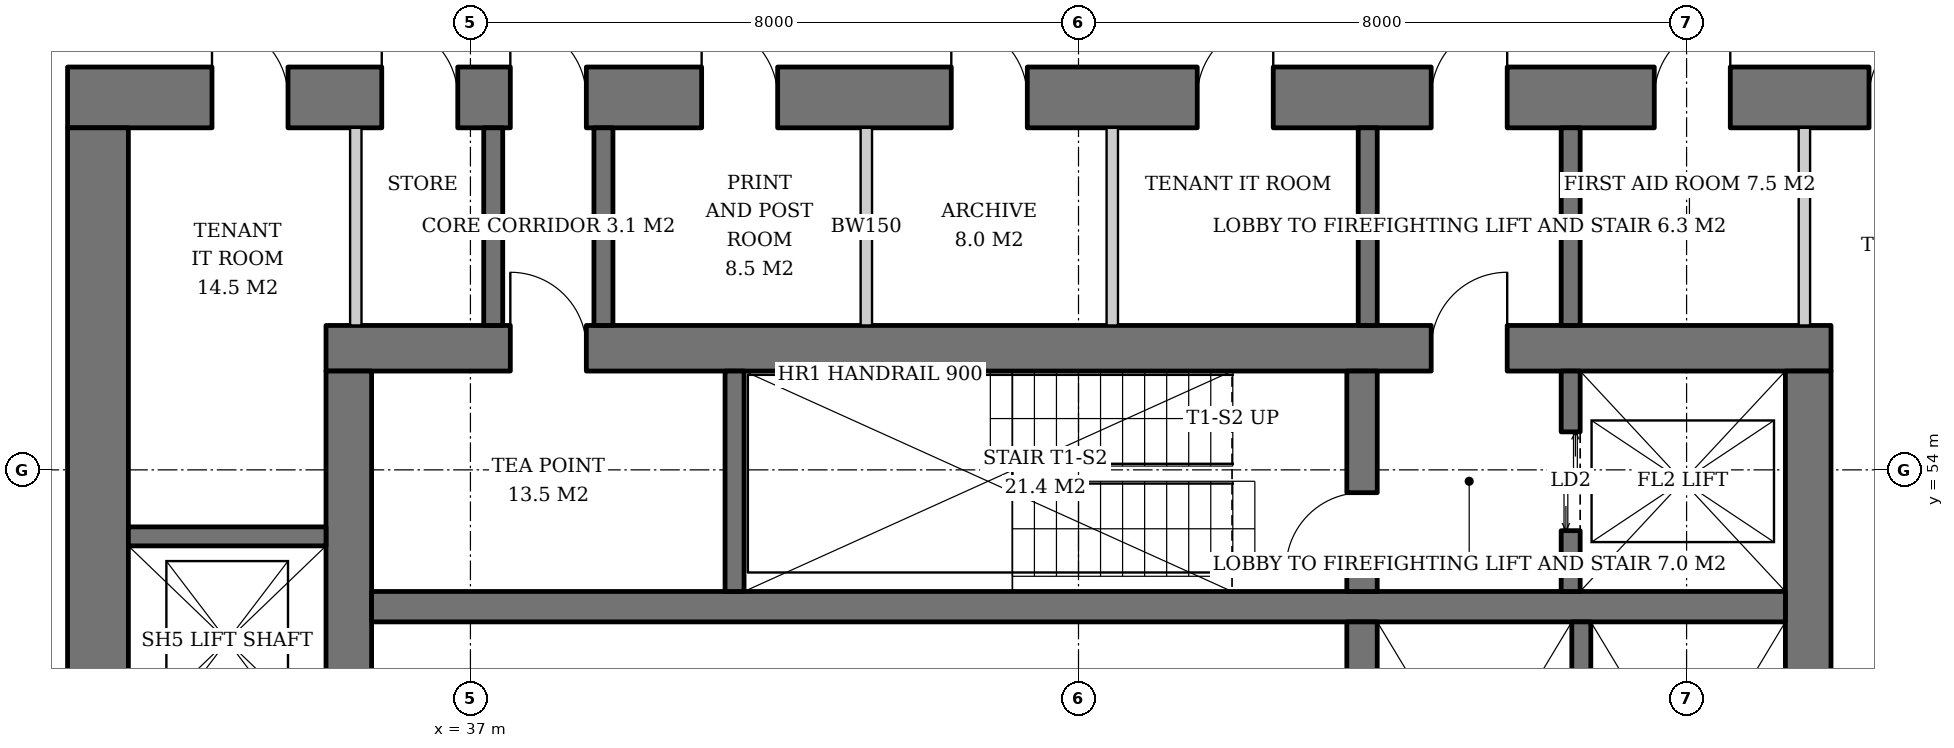
"""IFC4 building model, lengths in metres.
Left out: names, types, materials, properties, quantities, classifications, styles, units other than length and angle.
Written with IfcOpenShell. Run it as: python <this file> out.ifc"""

import sys

from ifc_helpers import new_model, si_unit, direction, frame, frame_2d, origin, place, context, subcontext, project, spatial, rectangle, extrude, element, fill, save


model = new_model("IFC4")
c1 = context("Model", 3, precision=1e-05, world=origin(), true_north=direction((0.0, 1.0)))
c2 = subcontext(c1, "Body", "Model", "MODEL_VIEW")
j1 = project(units=[si_unit("LENGTHUNIT", "METRE"), si_unit("PLANEANGLEUNIT", "RADIAN")], contexts=[c1])
p1 = place(None, origin())
s1 = spatial("IfcSite", under=j1, at=p1, CompositionType="ELEMENT")
p2 = place(p1, origin())
s2 = spatial("IfcBuilding", under=s1, at=p2, CompositionType="ELEMENT")
p3 = place(p2, frame((0.0, 0.0, 51.4)))
s3 = spatial("IfcBuildingStorey", under=s2, at=p3, CompositionType="ELEMENT", Elevation=51.4)
p4 = place(p3, frame((35.1, 55.6, 0.0), z_axis=(0.0, 0.0, 1.0), x_axis=(1.0, 0.0, 0.0)))
e1 = element("IfcWall", 1, at=p4, inside=s3, PredefinedType="SHEAR", context=c2, shape_type="SweptSolid", body=[
    extrude(rectangle(XDim=19.8, YDim=0.6, at=frame_2d((9.9, 0.0))), origin(), (0.0, 0.0, 1.0), 3.8),
])
p5 = place(p4, frame((14.54, 0.0, 0.0)))
e2 = element("IfcOpeningElement", 2, at=p5, cuts=e1, PredefinedType="OPENING", context=c2, shape_type="SweptSolid", body=[
    extrude(rectangle(XDim=1.0, YDim=2.1, at=frame_2d((0.5, 1.05))), frame((0.0, 0.31, 0.0), z_axis=(0.0, -1.0, 0.0), x_axis=(1.0, 0.0, 0.0)), (0.0, 0.0, 1.0), 0.62),
])
p6 = place(p4, frame((2.425, 0.0, 0.0)))
e3 = element("IfcOpeningElement", 3, at=p6, cuts=e1, PredefinedType="OPENING", context=c2, shape_type="SweptSolid", body=[
    extrude(rectangle(XDim=1.0, YDim=2.1, at=frame_2d((0.5, 1.05))), frame((0.0, 0.31, 0.0), z_axis=(0.0, -1.0, 0.0), x_axis=(1.0, 0.0, 0.0)), (0.0, 0.0, 1.0), 0.62),
])
p7 = place(p3, frame((35.4, 36.7, 0.0), z_axis=(0.0, 0.0, 1.0), x_axis=(0.0, 1.0, 0.0)))
e4 = element("IfcWall", 4, at=p7, inside=s3, PredefinedType="SHEAR", context=c2, shape_type="SweptSolid", body=[
    extrude(rectangle(XDim=18.6, YDim=0.6, at=frame_2d((9.3, 0.0))), origin(), (0.0, 0.0, 1.0), 3.8),
])
p8 = place(p7, frame((8.4, 0.0, 0.0)))
e5 = element("IfcOpeningElement", 5, at=p8, cuts=e4, PredefinedType="OPENING", context=c2, shape_type="SweptSolid", body=[
    extrude(rectangle(XDim=1.8, YDim=2.4, at=frame_2d((0.9, 1.2))), frame((0.0, 0.31, 0.0), z_axis=(0.0, -1.0, 0.0), x_axis=(1.0, 0.0, 0.0)), (0.0, 0.0, 1.0), 0.62),
])
p9 = place(p3, frame((54.6, 36.7, 0.0), z_axis=(0.0, 0.0, 1.0), x_axis=(0.0, 1.0, 0.0)))
e6 = element("IfcWall", 6, at=p9, inside=s3, PredefinedType="SHEAR", context=c2, shape_type="SweptSolid", body=[
    extrude(rectangle(XDim=18.6, YDim=0.6, at=frame_2d((9.3, 0.0))), origin(), (0.0, 0.0, 1.0), 3.8),
])
p10 = place(p9, frame((8.4, 0.0, 0.0)))
e7 = element("IfcOpeningElement", 7, at=p10, cuts=e6, PredefinedType="OPENING", context=c2, shape_type="SweptSolid", body=[
    extrude(rectangle(XDim=1.8, YDim=2.4, at=frame_2d((0.9, 1.2))), frame((0.0, 0.31, 0.0), z_axis=(0.0, -1.0, 0.0), x_axis=(1.0, 0.0, 0.0)), (0.0, 0.0, 1.0), 0.62),
])
p11 = place(p3, frame((31.7, 58.9, 0.0), z_axis=(0.0, 0.0, 1.0), x_axis=(1.0, 0.0, 0.0)))
e8 = element("IfcWall", 8, at=p11, inside=s3, PredefinedType="SHEAR", context=c2, shape_type="SweptSolid", body=[
    extrude(rectangle(XDim=26.6, YDim=0.8, at=frame_2d((13.3, 0.0))), origin(), (0.0, 0.0, 1.0), 3.8),
])
p12 = place(p11, frame((17.94, 0.0, 0.0)))
e9 = element("IfcOpeningElement", 9, at=p12, cuts=e8, PredefinedType="OPENING", context=c2, shape_type="SweptSolid", body=[
    extrude(rectangle(XDim=1.0, YDim=2.1, at=frame_2d((0.5, 1.05))), frame((0.0, 0.41, 0.0), z_axis=(0.0, -1.0, 0.0), x_axis=(1.0, 0.0, 0.0)), (0.0, 0.0, 1.0), 0.82),
])
p13 = place(p11, frame((5.825, 0.0, 0.0)))
e10 = element("IfcOpeningElement", 10, at=p13, cuts=e8, PredefinedType="OPENING", context=c2, shape_type="SweptSolid", body=[
    extrude(rectangle(XDim=1.0, YDim=2.1, at=frame_2d((0.5, 1.05))), frame((0.0, 0.41, 0.0), z_axis=(0.0, -1.0, 0.0), x_axis=(1.0, 0.0, 0.0)), (0.0, 0.0, 1.0), 0.82),
])
p14 = place(p11, frame((1.9, 0.0, 0.0)))
e11 = element("IfcOpeningElement", 11, at=p14, cuts=e8, PredefinedType="OPENING", context=c2, shape_type="SweptSolid", body=[
    extrude(rectangle(XDim=1.0, YDim=2.1, at=frame_2d((0.5, 1.05))), frame((0.0, 0.41, 0.0), z_axis=(0.0, -1.0, 0.0), x_axis=(1.0, 0.0, 0.0)), (0.0, 0.0, 1.0), 0.82),
])
p15 = place(p11, frame((4.134, 0.0, 0.0)))
e12 = element("IfcOpeningElement", 12, at=p15, cuts=e8, PredefinedType="OPENING", context=c2, shape_type="SweptSolid", body=[
    extrude(rectangle(XDim=1.0, YDim=2.1, at=frame_2d((0.5, 1.05))), frame((0.0, 0.41, 0.0), z_axis=(0.0, -1.0, 0.0), x_axis=(1.0, 0.0, 0.0)), (0.0, 0.0, 1.0), 0.82),
])
p16 = place(p11, frame((8.342, 0.0, 0.0)))
e13 = element("IfcOpeningElement", 13, at=p16, cuts=e8, PredefinedType="OPENING", context=c2, shape_type="SweptSolid", body=[
    extrude(rectangle(XDim=1.0, YDim=2.1, at=frame_2d((0.5, 1.05))), frame((0.0, 0.41, 0.0), z_axis=(0.0, -1.0, 0.0), x_axis=(1.0, 0.0, 0.0)), (0.0, 0.0, 1.0), 0.82),
])
p17 = place(p11, frame((11.626, 0.0, 0.0)))
e14 = element("IfcOpeningElement", 14, at=p17, cuts=e8, PredefinedType="OPENING", context=c2, shape_type="SweptSolid", body=[
    extrude(rectangle(XDim=1.0, YDim=2.1, at=frame_2d((0.5, 1.05))), frame((0.0, 0.41, 0.0), z_axis=(0.0, -1.0, 0.0), x_axis=(1.0, 0.0, 0.0)), (0.0, 0.0, 1.0), 0.82),
])
p18 = place(p11, frame((14.862, 0.0, 0.0)))
e15 = element("IfcOpeningElement", 15, at=p18, cuts=e8, PredefinedType="OPENING", context=c2, shape_type="SweptSolid", body=[
    extrude(rectangle(XDim=1.0, YDim=2.1, at=frame_2d((0.5, 1.05))), frame((0.0, 0.41, 0.0), z_axis=(0.0, -1.0, 0.0), x_axis=(1.0, 0.0, 0.0)), (0.0, 0.0, 1.0), 0.82),
])
p19 = place(p11, frame((20.875, 0.0, 0.0)))
e16 = element("IfcOpeningElement", 16, at=p19, cuts=e8, PredefinedType="OPENING", context=c2, shape_type="SweptSolid", body=[
    extrude(rectangle(XDim=1.0, YDim=2.1, at=frame_2d((0.5, 1.05))), frame((0.0, 0.41, 0.0), z_axis=(0.0, -1.0, 0.0), x_axis=(1.0, 0.0, 0.0)), (0.0, 0.0, 1.0), 0.82),
])
p20 = place(p11, frame((23.7, 0.0, 0.0)))
e17 = element("IfcOpeningElement", 17, at=p20, cuts=e8, PredefinedType="OPENING", context=c2, shape_type="SweptSolid", body=[
    extrude(rectangle(XDim=1.0, YDim=2.1, at=frame_2d((0.5, 1.05))), frame((0.0, 0.41, 0.0), z_axis=(0.0, -1.0, 0.0), x_axis=(1.0, 0.0, 0.0)), (0.0, 0.0, 1.0), 0.82),
])
p21 = place(p3, frame((32.1, 33.5, 0.0), z_axis=(0.0, 0.0, 1.0), x_axis=(0.0, 1.0, 0.0)))
e18 = element("IfcWall", 18, at=p21, inside=s3, PredefinedType="SHEAR", context=c2, shape_type="SweptSolid", body=[
    extrude(rectangle(XDim=25.0, YDim=0.8, at=frame_2d((12.5, 0.0))), origin(), (0.0, 0.0, 1.0), 3.8),
])
p22 = place(p21, frame((11.6, 0.0, 0.0)))
e19 = element("IfcOpeningElement", 19, at=p22, cuts=e18, PredefinedType="OPENING", context=c2, shape_type="SweptSolid", body=[
    extrude(rectangle(XDim=1.8, YDim=2.4, at=frame_2d((0.9, 1.2))), frame((0.0, 0.41, 0.0), z_axis=(0.0, -1.0, 0.0), x_axis=(1.0, 0.0, 0.0)), (0.0, 0.0, 1.0), 0.82),
])
p23 = place(p3, frame((35.7, 52.2, 0.0), z_axis=(0.0, 0.0, 1.0), x_axis=(1.0, 0.0, 0.0)))
e20 = element("IfcWall", 20, at=p23, inside=s3, PredefinedType="SHEAR", context=c2, shape_type="SweptSolid", body=[
    extrude(rectangle(XDim=18.6, YDim=0.4, at=frame_2d((9.3, 0.0))), origin(), (0.0, 0.0, 1.0), 3.8),
])
p24 = place(p3, frame((48.73, 40.0, 0.0), z_axis=(0.0, 0.0, 1.0), x_axis=(0.0, 1.0, 0.0)))
e21 = element("IfcWall", 21, at=p24, inside=s3, PredefinedType="SHEAR", context=c2, shape_type="SweptSolid", body=[
    extrude(rectangle(XDim=12.0, YDim=0.4, at=frame_2d((6.0, 0.0))), origin(), (0.0, 0.0, 1.0), 3.8),
])
p25 = place(p3, frame((48.73, 52.4, 0.0), z_axis=(0.0, 0.0, 1.0), x_axis=(0.0, 1.0, 0.0)))
e22 = element("IfcWall", 22, at=p25, inside=s3, PredefinedType="SHEAR", context=c2, shape_type="SweptSolid", body=[
    extrude(rectangle(XDim=2.9, YDim=0.4, at=frame_2d((1.45, 0.0))), origin(), (0.0, 0.0, 1.0), 3.8),
])
p26 = place(p25, frame((0.3, 0.0, 0.0)))
e23 = element("IfcOpeningElement", 23, at=p26, cuts=e22, PredefinedType="OPENING", context=c2, shape_type="SweptSolid", body=[
    extrude(rectangle(XDim=1.0, YDim=2.1, at=frame_2d((0.5, 1.05))), frame((0.0, 0.21, 0.0), z_axis=(0.0, -1.0, 0.0), x_axis=(1.0, 0.0, 0.0)), (0.0, 0.0, 1.0), 0.42),
])
p27 = place(p3, frame((40.475, 52.4, 0.0), z_axis=(0.0, 0.0, 1.0), x_axis=(0.0, 1.0, 0.0)))
e24 = element("IfcWall", 24, at=p27, inside=s3, PredefinedType="SHEAR", context=c2, shape_type="SweptSolid", body=[
    extrude(rectangle(XDim=2.9, YDim=0.25, at=frame_2d((1.45, 0.0))), origin(), (0.0, 0.0, 1.0), 3.8),
])
p28 = place(p3, frame((51.475, 52.4, 0.0), z_axis=(0.0, 0.0, 1.0), x_axis=(0.0, 1.0, 0.0)))
e25 = element("IfcWall", 25, at=p28, inside=s3, PredefinedType="SHEAR", context=c2, shape_type="SweptSolid", body=[
    extrude(rectangle(XDim=2.9, YDim=0.25, at=frame_2d((1.45, 0.0))), origin(), (0.0, 0.0, 1.0), 3.8),
])
p29 = place(p28, frame((0.8, 0.0, 0.0)))
e26 = element("IfcOpeningElement", 26, at=p29, cuts=e25, PredefinedType="OPENING", context=c2, shape_type="SweptSolid", body=[
    extrude(rectangle(XDim=1.3, YDim=2.2, at=frame_2d((0.65, 1.1))), frame((0.0, 0.135, 0.0), z_axis=(0.0, -1.0, 0.0), x_axis=(1.0, 0.0, 0.0)), (0.0, 0.0, 1.0), 0.27),
])
p30 = place(p3, frame((51.615, 47.75, 0.0), z_axis=(0.0, 0.0, 1.0), x_axis=(0.0, 1.0, 0.0)))
e27 = element("IfcWall", 27, at=p30, inside=s3, PredefinedType="SHEAR", context=c2, shape_type="SweptSolid", body=[
    extrude(rectangle(XDim=4.25, YDim=0.25, at=frame_2d((2.125, 0.0))), origin(), (0.0, 0.0, 1.0), 3.8),
])
p31 = place(p3, frame((32.5, 53.125, 0.0), z_axis=(0.0, 0.0, 1.0), x_axis=(1.0, 0.0, 0.0)))
e28 = element("IfcWall", 28, at=p31, inside=s3, PredefinedType="SHEAR", context=c2, shape_type="SweptSolid", body=[
    extrude(rectangle(XDim=2.6, YDim=0.25, at=frame_2d((1.3, 0.0))), origin(), (0.0, 0.0, 1.0), 3.8),
])
for number, where, z_axis, x_axis in (
    (29, (48.805, 55.9, 0.0), (0.0, 0.0, 1.0), (0.0, 1.0, 0.0)),
    (30, (51.475, 55.9, 0.0), (0.0, 0.0, 1.0), (0.0, 1.0, 0.0)),
    (31, (37.3, 55.9, 0.0), (0.0, 0.0, 1.0), (0.0, 1.0, 0.0)),
    (32, (38.75, 55.9, 0.0), (0.0, 0.0, 1.0), (0.0, 1.0, 0.0)),
):
    element("IfcWall", number, at=place(p3, frame(where, z_axis=z_axis, x_axis=x_axis)), inside=s3, PredefinedType="SOLIDWALL", context=c2, shape_type="SweptSolid", body=[
        extrude(rectangle(XDim=2.6, YDim=0.25, at=frame_2d((1.3, 0.0))), origin(), (0.0, 0.0, 1.0), 3.62),
    ])
for number, where, z_axis, x_axis in (
    (33, (35.492, 55.9, 0.0), (0.0, 0.0, 1.0), (0.0, 1.0, 0.0)),
    (34, (42.209, 55.9, 0.0), (0.0, 0.0, 1.0), (0.0, 1.0, 0.0)),
    (35, (45.444, 55.9, 0.0), (0.0, 0.0, 1.0), (0.0, 1.0, 0.0)),
    (36, (54.55, 55.9, 0.0), (0.0, 0.0, 1.0), (0.0, 1.0, 0.0)),
):
    element("IfcWall", number, at=place(p3, frame(where, z_axis=z_axis, x_axis=x_axis)), inside=s3, PredefinedType="SOLIDWALL", context=c2, shape_type="SweptSolid", body=[
        extrude(rectangle(XDim=2.6, YDim=0.15, at=frame_2d((1.3, 0.0))), origin(), (0.0, 0.0, 1.0), 3.62),
    ])
p32 = place(p29, origin())
e37 = element("IfcDoor", 37, at=p32, inside=s3, OperationType="DOUBLE_DOOR_SLIDING", PredefinedType="DOOR", context=c2, shape_type="SweptSolid", body=[
    extrude(rectangle(XDim=1.3, YDim=2.2, at=frame_2d((0.65, 1.1))), frame((0.0, 0.025, 0.0), z_axis=(0.0, -1.0, 0.0), x_axis=(1.0, 0.0, 0.0)), (0.0, 0.0, 1.0), 0.05),
])
fill(e26, e37)
p33 = place(p26, origin())
e38 = element("IfcDoor", 38, at=p33, inside=s3, OperationType="SINGLE_SWING_LEFT", PredefinedType="DOOR", context=c2, shape_type="SweptSolid", body=[
    extrude(rectangle(XDim=1.0, YDim=2.1, at=frame_2d((0.5, 1.05))), frame((0.0, 0.025, 0.0), z_axis=(0.0, -1.0, 0.0), x_axis=(1.0, 0.0, 0.0)), (0.0, 0.0, 1.0), 0.05),
])
fill(e23, e38)
p34 = place(p5, origin())
e39 = element("IfcDoor", 39, at=p34, inside=s3, OperationType="SINGLE_SWING_RIGHT", PredefinedType="DOOR", context=c2, shape_type="SweptSolid", body=[
    extrude(rectangle(XDim=1.0, YDim=2.1, at=frame_2d((0.5, 1.05))), frame((0.0, 0.025, 0.0), z_axis=(0.0, -1.0, 0.0), x_axis=(1.0, 0.0, 0.0)), (0.0, 0.0, 1.0), 0.05),
])
fill(e2, e39)
p35 = place(p12, origin())
e40 = element("IfcDoor", 40, at=p35, inside=s3, OperationType="SINGLE_SWING_RIGHT", PredefinedType="DOOR", context=c2, shape_type="SweptSolid", body=[
    extrude(rectangle(XDim=1.0, YDim=2.1, at=frame_2d((0.5, 1.05))), frame((0.0, 0.025, 0.0), z_axis=(0.0, -1.0, 0.0), x_axis=(1.0, 0.0, 0.0)), (0.0, 0.0, 1.0), 0.05),
])
fill(e9, e40)
p36 = place(p13, origin())
e41 = element("IfcDoor", 41, at=p36, inside=s3, OperationType="SINGLE_SWING_LEFT", PredefinedType="DOOR", context=c2, shape_type="SweptSolid", body=[
    extrude(rectangle(XDim=1.0, YDim=2.1, at=frame_2d((0.5, 1.05))), frame((0.0, 0.025, 0.0), z_axis=(0.0, -1.0, 0.0), x_axis=(1.0, 0.0, 0.0)), (0.0, 0.0, 1.0), 0.05),
])
fill(e10, e41)
p37 = place(p6, origin())
e42 = element("IfcDoor", 42, at=p37, inside=s3, OperationType="SINGLE_SWING_LEFT", PredefinedType="DOOR", context=c2, shape_type="SweptSolid", body=[
    extrude(rectangle(XDim=1.0, YDim=2.1, at=frame_2d((0.5, 1.05))), frame((0.0, -0.24, 0.0), z_axis=(0.0, -1.0, 0.0), x_axis=(1.0, 0.0, 0.0)), (0.0, 0.0, 1.0), 0.05),
])
fill(e3, e42)
p38 = place(p14, origin())
e43 = element("IfcDoor", 43, at=p38, inside=s3, OperationType="SINGLE_SWING_LEFT", PredefinedType="DOOR", context=c2, shape_type="SweptSolid", body=[
    extrude(rectangle(XDim=1.0, YDim=2.1, at=frame_2d((0.5, 1.05))), frame((0.0, -0.34, 0.0), z_axis=(0.0, -1.0, 0.0), x_axis=(1.0, 0.0, 0.0)), (0.0, 0.0, 1.0), 0.05),
])
fill(e11, e43)
p39 = place(p15, origin())
e44 = element("IfcDoor", 44, at=p39, inside=s3, OperationType="SINGLE_SWING_LEFT", PredefinedType="DOOR", context=c2, shape_type="SweptSolid", body=[
    extrude(rectangle(XDim=1.0, YDim=2.1, at=frame_2d((0.5, 1.05))), frame((0.0, -0.34, 0.0), z_axis=(0.0, -1.0, 0.0), x_axis=(1.0, 0.0, 0.0)), (0.0, 0.0, 1.0), 0.05),
])
fill(e12, e44)
p40 = place(p16, origin())
e45 = element("IfcDoor", 45, at=p40, inside=s3, OperationType="SINGLE_SWING_LEFT", PredefinedType="DOOR", context=c2, shape_type="SweptSolid", body=[
    extrude(rectangle(XDim=1.0, YDim=2.1, at=frame_2d((0.5, 1.05))), frame((0.0, -0.34, 0.0), z_axis=(0.0, -1.0, 0.0), x_axis=(1.0, 0.0, 0.0)), (0.0, 0.0, 1.0), 0.05),
])
fill(e13, e45)
p41 = place(p17, origin())
e46 = element("IfcDoor", 46, at=p41, inside=s3, OperationType="SINGLE_SWING_LEFT", PredefinedType="DOOR", context=c2, shape_type="SweptSolid", body=[
    extrude(rectangle(XDim=1.0, YDim=2.1, at=frame_2d((0.5, 1.05))), frame((0.0, -0.34, 0.0), z_axis=(0.0, -1.0, 0.0), x_axis=(1.0, 0.0, 0.0)), (0.0, 0.0, 1.0), 0.05),
])
fill(e14, e46)
p42 = place(p18, origin())
e47 = element("IfcDoor", 47, at=p42, inside=s3, OperationType="SINGLE_SWING_RIGHT", PredefinedType="DOOR", context=c2, shape_type="SweptSolid", body=[
    extrude(rectangle(XDim=1.0, YDim=2.1, at=frame_2d((0.5, 1.05))), frame((0.0, -0.34, 0.0), z_axis=(0.0, -1.0, 0.0), x_axis=(1.0, 0.0, 0.0)), (0.0, 0.0, 1.0), 0.05),
])
fill(e15, e47)
p43 = place(p19, origin())
e48 = element("IfcDoor", 48, at=p43, inside=s3, OperationType="SINGLE_SWING_RIGHT", PredefinedType="DOOR", context=c2, shape_type="SweptSolid", body=[
    extrude(rectangle(XDim=1.0, YDim=2.1, at=frame_2d((0.5, 1.05))), frame((0.0, -0.34, 0.0), z_axis=(0.0, -1.0, 0.0), x_axis=(1.0, 0.0, 0.0)), (0.0, 0.0, 1.0), 0.05),
])
fill(e16, e48)
p44 = place(p20, origin())
e49 = element("IfcDoor", 49, at=p44, inside=s3, OperationType="SINGLE_SWING_RIGHT", PredefinedType="DOOR", context=c2, shape_type="SweptSolid", body=[
    extrude(rectangle(XDim=1.0, YDim=2.1, at=frame_2d((0.5, 1.05))), frame((0.0, -0.34, 0.0), z_axis=(0.0, -1.0, 0.0), x_axis=(1.0, 0.0, 0.0)), (0.0, 0.0, 1.0), 0.05),
])
fill(e17, e49)
save(model, sys.argv[1])
